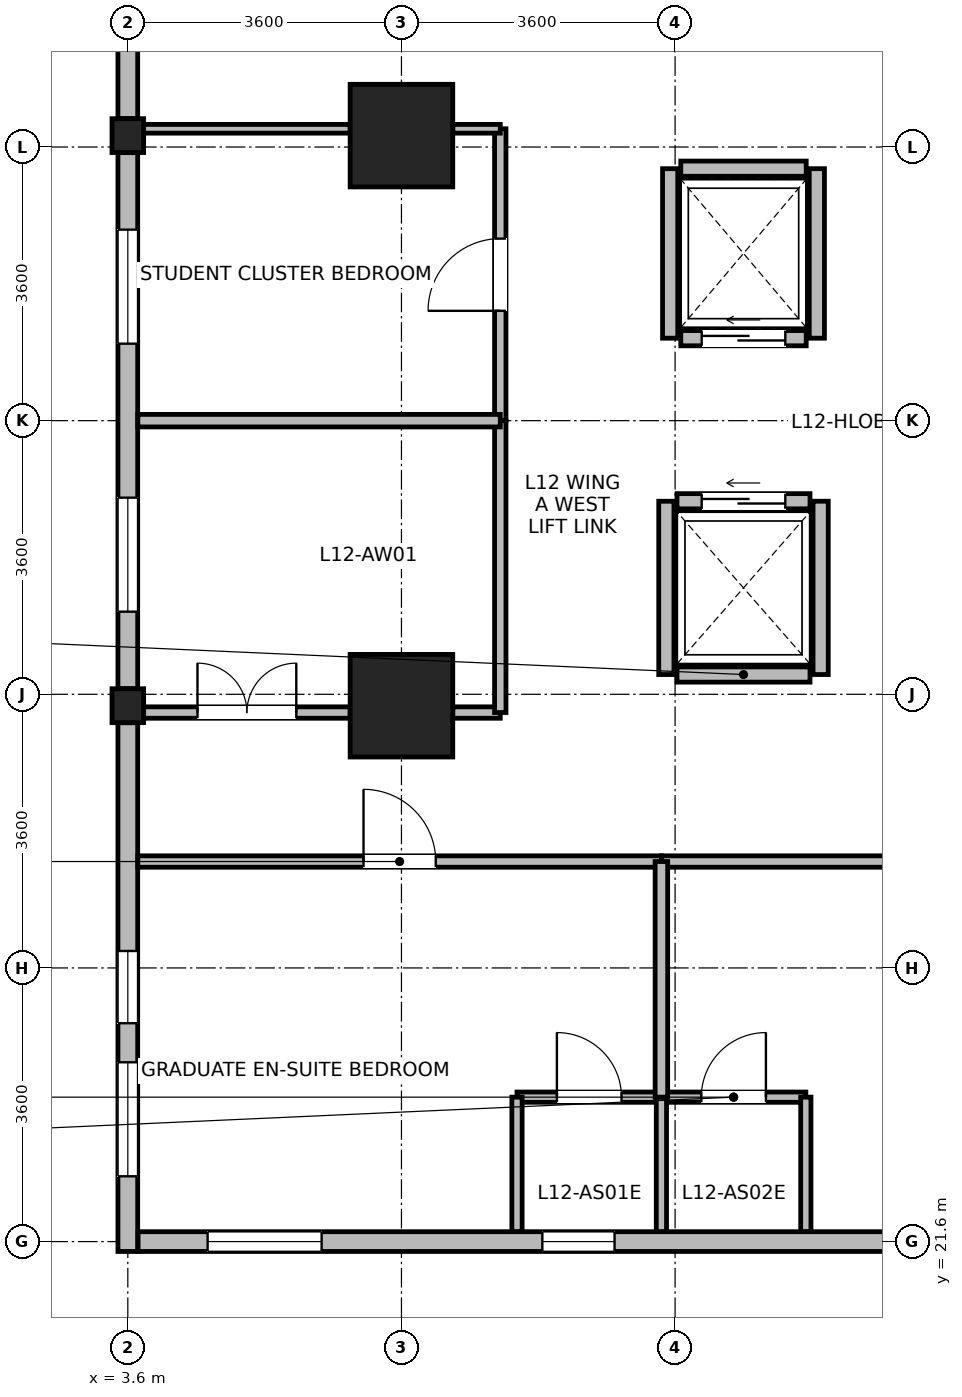
"""IFC4 building model, lengths in metres.
Left out: names, types, materials, properties, quantities, classifications, styles, units other than length and angle.
Written with IfcOpenShell. Run it as: python <this file> out.ifc"""

import sys

from ifc_helpers import new_model, si_unit, direction, frame, frame_2d, origin, origin_2d, place, context, subcontext, project, spatial, rectangle, i_section, extrude, source, transform, mapped, element, fill, save


model = new_model("IFC4")
c1 = context("Model", 3, precision=1e-05, world=origin(), true_north=direction((0.0, 1.0)))
c2 = subcontext(c1, "Body", "Model", "MODEL_VIEW")
j1 = project(units=[si_unit("LENGTHUNIT", "METRE"), si_unit("PLANEANGLEUNIT", "RADIAN")], contexts=[c1])
p1 = place(None, origin())
s1 = spatial("IfcSite", under=j1, at=p1, CompositionType="ELEMENT")
p2 = place(p1, origin())
s2 = spatial("IfcBuilding", under=s1, at=p2, CompositionType="ELEMENT")
p3 = place(p2, frame((0.0, 0.0, 51.2)))
s3 = spatial("IfcBuildingStorey", under=s2, at=p3, CompositionType="ELEMENT", Elevation=51.2)
m1 = source(origin(), c2, "Body", "SweptSolid", [
    extrude(rectangle(XDim=1.35, YDim=1.35, at=origin_2d()), origin(), (0.0, 0.0, 1.0), 3.7),
])
for number, where, z_axis, x_axis in (
    (1, (7.2, 28.65, 0.0), (0.0, 0.0, 1.0), (1.0, 0.0, 0.0)),
    (2, (7.2, 36.15, 0.0), (0.0, 0.0, 1.0), (1.0, 0.0, 0.0)),
):
    element("IfcColumn", number, at=place(p3, frame(where, z_axis=z_axis, x_axis=x_axis)), inside=s3, PredefinedType="COLUMN", context=c2, shape_type="MappedRepresentation", body=[
        mapped(m1, transform((0.0, 0.0, 0.0), x_axis=(1.0, 0.0, 0.0), y_axis=(0.0, 1.0, 0.0), z_axis=(0.0, 0.0, 1.0), scale=1.0)),
    ])
m2 = source(origin(), c2, "Body", "SweptSolid", [
    extrude(i_section(OverallWidth=0.416, OverallDepth=0.446, WebThickness=0.029, FlangeThickness=0.04, FilletRadius=0.015, at=origin_2d()), origin(), (0.0, 0.0, 1.0), 3.7),
])
for number, where, z_axis, x_axis in (
    (3, (3.6, 28.65, 0.0), (0.0, 0.0, 1.0), (1.0, 0.0, 0.0)),
    (4, (3.6, 36.15, 0.0), (0.0, 0.0, 1.0), (1.0, 0.0, 0.0)),
):
    element("IfcColumn", number, at=place(p3, frame(where, z_axis=z_axis, x_axis=x_axis)), inside=s3, PredefinedType="COLUMN", context=c2, shape_type="MappedRepresentation", body=[
        mapped(m2, transform((0.0, 0.0, 0.0), x_axis=(1.0, 0.0, 0.0), y_axis=(0.0, 1.0, 0.0), z_axis=(0.0, 0.0, 1.0), scale=1.0)),
    ])
p4 = place(p3, frame((3.6, 36.374, 0.0), z_axis=(0.0, 0.0, 1.0), x_axis=(0.0, 1.0, 0.0)))
e5 = element("IfcWall", 5, at=p4, inside=s3, PredefinedType="STANDARD", context=c2, shape_type="SweptSolid", body=[
    extrude(rectangle(XDim=3.356, YDim=0.26, at=frame_2d((1.678, 0.0))), origin(), (0.0, 0.0, 1.0), 3.43),
])
p5 = place(p4, frame((0.928, 0.0, 0.85)))
e6 = element("IfcOpeningElement", 6, at=p5, cuts=e5, PredefinedType="OPENING", context=c2, shape_type="SweptSolid", body=[
    extrude(rectangle(XDim=1.5, YDim=1.85, at=frame_2d((0.75, 0.925))), frame((0.0, 0.14, 0.0), z_axis=(0.0, -1.0, 0.0), x_axis=(1.0, 0.0, 0.0)), (0.0, 0.0, 1.0), 0.28),
])
p6 = place(p3, frame((3.6, 28.874, 0.0), z_axis=(0.0, 0.0, 1.0), x_axis=(0.0, 1.0, 0.0)))
e7 = element("IfcWall", 7, at=p6, inside=s3, PredefinedType="STANDARD", context=c2, shape_type="SweptSolid", body=[
    extrude(rectangle(XDim=7.052, YDim=0.26, at=frame_2d((3.526, 0.0))), origin(), (0.0, 0.0, 1.0), 2.93),
])
p7 = place(p6, frame((1.013, 0.0, 0.85)))
e8 = element("IfcOpeningElement", 8, at=p7, cuts=e7, PredefinedType="OPENING", context=c2, shape_type="SweptSolid", body=[
    extrude(rectangle(XDim=1.5, YDim=1.85, at=frame_2d((0.75, 0.925))), frame((0.0, 0.14, 0.0), z_axis=(0.0, -1.0, 0.0), x_axis=(1.0, 0.0, 0.0)), (0.0, 0.0, 1.0), 0.28),
])
p8 = place(p6, frame((4.539, 0.0, 0.85)))
e9 = element("IfcOpeningElement", 9, at=p8, cuts=e7, PredefinedType="OPENING", context=c2, shape_type="SweptSolid", body=[
    extrude(rectangle(XDim=1.5, YDim=1.85, at=frame_2d((0.75, 0.925))), frame((0.0, 0.14, 0.0), z_axis=(0.0, -1.0, 0.0), x_axis=(1.0, 0.0, 0.0)), (0.0, 0.0, 1.0), 0.28),
])
p9 = place(p3, frame((3.6, 21.47, 0.0), z_axis=(0.0, 0.0, 1.0), x_axis=(0.0, 1.0, 0.0)))
e10 = element("IfcWall", 10, at=p9, inside=s3, PredefinedType="STANDARD", context=c2, shape_type="SweptSolid", body=[
    extrude(rectangle(XDim=6.956, YDim=0.26, at=frame_2d((3.478, 0.0))), origin(), (0.0, 0.0, 1.0), 3.43),
])
p10 = place(p9, frame((0.989, 0.0, 0.85)))
e11 = element("IfcOpeningElement", 11, at=p10, cuts=e10, PredefinedType="OPENING", context=c2, shape_type="SweptSolid", body=[
    extrude(rectangle(XDim=1.5, YDim=1.85, at=frame_2d((0.75, 0.925))), frame((0.0, 0.14, 0.0), z_axis=(0.0, -1.0, 0.0), x_axis=(1.0, 0.0, 0.0)), (0.0, 0.0, 1.0), 0.28),
])
p11 = place(p9, frame((3.003, 0.0, 0.85)))
e12 = element("IfcOpeningElement", 12, at=p11, cuts=e10, PredefinedType="OPENING", context=c2, shape_type="SweptSolid", body=[
    extrude(rectangle(XDim=0.95, YDim=1.75, at=frame_2d((0.475, 0.875))), frame((0.0, 0.14, 0.0), z_axis=(0.0, -1.0, 0.0), x_axis=(1.0, 0.0, 0.0)), (0.0, 0.0, 1.0), 0.28),
])
p12 = place(p3, frame((13.724, 21.6, 0.0), z_axis=(0.0, 0.0, 1.0), x_axis=(-1.0, 0.0, 0.0)))
e13 = element("IfcWall", 13, at=p12, inside=s3, PredefinedType="STANDARD", context=c2, shape_type="SweptSolid", body=[
    extrude(rectangle(XDim=9.989, YDim=0.26, at=frame_2d((4.995, 0.0))), origin(), (0.0, 0.0, 1.0), 3.43),
])
p13 = place(p12, frame((7.574, 0.0, 0.85)))
e14 = element("IfcOpeningElement", 14, at=p13, cuts=e13, PredefinedType="OPENING", context=c2, shape_type="SweptSolid", body=[
    extrude(rectangle(XDim=1.5, YDim=1.85, at=frame_2d((0.75, 0.925))), frame((0.0, 0.14, 0.0), z_axis=(0.0, -1.0, 0.0), x_axis=(1.0, 0.0, 0.0)), (0.0, 0.0, 1.0), 0.28),
])
p14 = place(p12, frame((3.72, 0.0, 0.85)))
e15 = element("IfcOpeningElement", 15, at=p14, cuts=e13, PredefinedType="OPENING", context=c2, shape_type="SweptSolid", body=[
    extrude(rectangle(XDim=0.95, YDim=1.75, at=frame_2d((0.475, 0.875))), frame((0.0, 0.14, 0.0), z_axis=(0.0, -1.0, 0.0), x_axis=(1.0, 0.0, 0.0)), (0.0, 0.0, 1.0), 0.28),
])
p15 = place(p3, frame((10.825, 29.06, 0.0), z_axis=(0.0, 0.0, 1.0), x_axis=(1.0, 0.0, 0.0)))
e16 = element("IfcWall", 16, at=p15, inside=s3, PredefinedType="PARTITIONING", context=c2, shape_type="SweptSolid", body=[
    extrude(rectangle(XDim=1.75, YDim=0.2, at=frame_2d((0.875, 0.0))), origin(), (0.0, 0.0, 1.0), 3.43),
])
p16 = place(p3, frame((10.825, 31.34, 0.0), z_axis=(0.0, 0.0, 1.0), x_axis=(1.0, 0.0, 0.0)))
e17 = element("IfcWall", 17, at=p16, inside=s3, PredefinedType="PARTITIONING", context=c2, shape_type="SweptSolid", body=[
    extrude(rectangle(XDim=1.75, YDim=0.2, at=frame_2d((0.875, 0.0))), origin(), (0.0, 0.0, 1.0), 3.43),
])
p17 = place(p16, frame((0.325, 0.0, 0.0)))
e18 = element("IfcOpeningElement", 18, at=p17, cuts=e17, PredefinedType="OPENING", context=c2, shape_type="SweptSolid", body=[
    extrude(rectangle(XDim=1.1, YDim=2.12, at=frame_2d((0.55, 1.06))), frame((0.0, 0.11, 0.0), z_axis=(0.0, -1.0, 0.0), x_axis=(1.0, 0.0, 0.0)), (0.0, 0.0, 1.0), 0.22),
])
for number, where, z_axis, x_axis in (
    (19, (10.685, 29.06, 0.0), (0.0, 0.0, 1.0), (0.0, 1.0, 0.0)),
    (20, (12.715, 29.06, 0.0), (0.0, 0.0, 1.0), (0.0, 1.0, 0.0)),
):
    element("IfcWall", number, at=place(p3, frame(where, z_axis=z_axis, x_axis=x_axis)), inside=s3, PredefinedType="PARTITIONING", context=c2, shape_type="SweptSolid", body=[
        extrude(rectangle(XDim=2.28, YDim=0.2, at=frame_2d((1.14, 0.0))), origin(), (0.0, 0.0, 1.0), 3.43),
    ])
p18 = place(p3, frame((10.875, 33.485, 0.0), z_axis=(0.0, 0.0, 1.0), x_axis=(1.0, 0.0, 0.0)))
e21 = element("IfcWall", 21, at=p18, inside=s3, PredefinedType="PARTITIONING", context=c2, shape_type="SweptSolid", body=[
    extrude(rectangle(XDim=1.65, YDim=0.2, at=frame_2d((0.825, 0.0))), origin(), (0.0, 0.0, 1.0), 3.43),
])
p19 = place(p18, frame((0.275, 0.0, 0.0)))
e22 = element("IfcOpeningElement", 22, at=p19, cuts=e21, PredefinedType="OPENING", context=c2, shape_type="SweptSolid", body=[
    extrude(rectangle(XDim=1.1, YDim=2.12, at=frame_2d((0.55, 1.06))), frame((0.0, 0.11, 0.0), z_axis=(0.0, -1.0, 0.0), x_axis=(1.0, 0.0, 0.0)), (0.0, 0.0, 1.0), 0.22),
])
p20 = place(p3, frame((10.875, 35.715, 0.0), z_axis=(0.0, 0.0, 1.0), x_axis=(1.0, 0.0, 0.0)))
e23 = element("IfcWall", 23, at=p20, inside=s3, PredefinedType="PARTITIONING", context=c2, shape_type="SweptSolid", body=[
    extrude(rectangle(XDim=1.65, YDim=0.2, at=frame_2d((0.825, 0.0))), origin(), (0.0, 0.0, 1.0), 3.43),
])
for number, where, z_axis, x_axis in (
    (24, (10.735, 33.485, 0.0), (0.0, 0.0, 1.0), (0.0, 1.0, 0.0)),
    (25, (12.665, 33.485, 0.0), (0.0, 0.0, 1.0), (0.0, 1.0, 0.0)),
):
    element("IfcWall", number, at=place(p3, frame(where, z_axis=z_axis, x_axis=x_axis)), inside=s3, PredefinedType="PARTITIONING", context=c2, shape_type="SweptSolid", body=[
        extrude(rectangle(XDim=2.23, YDim=0.2, at=frame_2d((1.115, 0.0))), origin(), (0.0, 0.0, 1.0), 3.43),
    ])
p21 = place(p3, frame((10.62, 23.5, 0.0), z_axis=(0.0, 0.0, 1.0), x_axis=(1.0, 0.0, 0.0)))
e26 = element("IfcWall", 26, at=p21, inside=s3, PredefinedType="PARTITIONING", context=c2, shape_type="SweptSolid", body=[
    extrude(rectangle(XDim=1.9, YDim=0.135, at=frame_2d((0.95, 0.0))), origin(), (0.0, 0.0, 1.0), 3.43),
])
p22 = place(p21, frame((0.525, 0.0, 0.0)))
e27 = element("IfcOpeningElement", 27, at=p22, cuts=e26, PredefinedType="OPENING", context=c2, shape_type="SweptSolid", body=[
    extrude(rectangle(XDim=0.85, YDim=2.04, at=frame_2d((0.425, 1.02))), frame((0.0, 0.078, 0.0), z_axis=(0.0, -1.0, 0.0), x_axis=(1.0, 0.0, 0.0)), (0.0, 0.0, 1.0), 0.155),
])
p23 = place(p3, frame((8.72, 23.5, 0.0), z_axis=(0.0, 0.0, 1.0), x_axis=(1.0, 0.0, 0.0)))
e28 = element("IfcWall", 28, at=p23, inside=s3, PredefinedType="PARTITIONING", context=c2, shape_type="SweptSolid", body=[
    extrude(rectangle(XDim=1.9, YDim=0.135, at=frame_2d((0.95, 0.0))), origin(), (0.0, 0.0, 1.0), 3.43),
])
p24 = place(p23, frame((0.525, 0.0, 0.0)))
e29 = element("IfcOpeningElement", 29, at=p24, cuts=e28, PredefinedType="OPENING", context=c2, shape_type="SweptSolid", body=[
    extrude(rectangle(XDim=0.85, YDim=2.04, at=frame_2d((0.425, 1.02))), frame((0.0, 0.078, 0.0), z_axis=(0.0, -1.0, 0.0), x_axis=(1.0, 0.0, 0.0)), (0.0, 0.0, 1.0), 0.155),
])
for number, where, z_axis, x_axis in (
    (30, (8.72, 21.732, 0.0), (0.0, 0.0, 1.0), (0.0, 1.0, 0.0)),
    (31, (10.62, 21.732, 0.0), (0.0, 0.0, 1.0), (0.0, 1.0, 0.0)),
    (32, (12.52, 21.732, 0.0), (0.0, 0.0, 1.0), (0.0, 1.0, 0.0)),
):
    element("IfcWall", number, at=place(p3, frame(where, z_axis=z_axis, x_axis=x_axis)), inside=s3, PredefinedType="PARTITIONING", context=c2, shape_type="SweptSolid", body=[
        extrude(rectangle(XDim=1.768, YDim=0.135, at=frame_2d((0.884, 0.0))), origin(), (0.0, 0.0, 1.0), 3.43),
    ])
p25 = place(p3, frame((10.62, 26.6, 0.0), z_axis=(0.0, 0.0, 1.0), x_axis=(1.0, 0.0, 0.0)))
e33 = element("IfcWall", 33, at=p25, inside=s3, PredefinedType="PARTITIONING", context=c2, shape_type="SweptSolid", body=[
    extrude(rectangle(XDim=7.42, YDim=0.15, at=frame_2d((3.71, 0.0))), origin(), (0.0, 0.0, 1.0), 3.43),
])
p26 = place(p25, frame((3.235, 0.0, 0.0)))
e34 = element("IfcOpeningElement", 34, at=p26, cuts=e33, PredefinedType="OPENING", context=c2, shape_type="SweptSolid", body=[
    extrude(rectangle(XDim=0.95, YDim=2.1, at=frame_2d((0.475, 1.05))), frame((0.0, 0.085, 0.0), z_axis=(0.0, -1.0, 0.0), x_axis=(1.0, 0.0, 0.0)), (0.0, 0.0, 1.0), 0.17),
])
p27 = place(p3, frame((3.732, 26.6, 0.0), z_axis=(0.0, 0.0, 1.0), x_axis=(1.0, 0.0, 0.0)))
e35 = element("IfcWall", 35, at=p27, inside=s3, PredefinedType="PARTITIONING", context=c2, shape_type="SweptSolid", body=[
    extrude(rectangle(XDim=6.888, YDim=0.15, at=frame_2d((3.444, 0.0))), origin(), (0.0, 0.0, 1.0), 3.43),
])
p28 = place(p27, frame((2.969, 0.0, 0.0)))
e36 = element("IfcOpeningElement", 36, at=p28, cuts=e35, PredefinedType="OPENING", context=c2, shape_type="SweptSolid", body=[
    extrude(rectangle(XDim=0.95, YDim=2.1, at=frame_2d((0.475, 1.05))), frame((0.0, 0.085, 0.0), z_axis=(0.0, -1.0, 0.0), x_axis=(1.0, 0.0, 0.0)), (0.0, 0.0, 1.0), 0.17),
])
p29 = place(p3, frame((3.808, 28.56, 0.0), z_axis=(0.0, 0.0, 1.0), x_axis=(1.0, 0.0, 0.0)))
e37 = element("IfcWall", 37, at=p29, inside=s3, PredefinedType="PARTITIONING", context=c2, shape_type="SweptSolid", body=[
    extrude(rectangle(XDim=2.717, YDim=0.15, at=frame_2d((1.358, 0.0))), origin(), (0.0, 0.0, 1.0), 2.78),
])
p30 = place(p29, frame((0.708, 0.0, 0.0)))
e38 = element("IfcOpeningElement", 38, at=p30, cuts=e37, PredefinedType="OPENING", context=c2, shape_type="SweptSolid", body=[
    extrude(rectangle(XDim=1.3, YDim=2.12, at=frame_2d((0.65, 1.06))), frame((0.0, 0.085, 0.0), z_axis=(0.0, -1.0, 0.0), x_axis=(1.0, 0.0, 0.0)), (0.0, 0.0, 1.0), 0.17),
])
p31 = place(p3, frame((7.875, 28.56, 0.0), z_axis=(0.0, 0.0, 1.0), x_axis=(1.0, 0.0, 0.0)))
e39 = element("IfcWall", 39, at=p31, inside=s3, PredefinedType="PARTITIONING", context=c2, shape_type="SweptSolid", body=[
    extrude(rectangle(XDim=0.625, YDim=0.15, at=frame_2d((0.312, 0.0))), origin(), (0.0, 0.0, 1.0), 2.78),
])
p32 = place(p3, frame((8.5, 32.4, 0.0), z_axis=(0.0, 0.0, 1.0), x_axis=(0.0, 1.0, 0.0)))
e40 = element("IfcWall", 40, at=p32, inside=s3, PredefinedType="PARTITIONING", context=c2, shape_type="SweptSolid", body=[
    extrude(rectangle(XDim=3.84, YDim=0.15, at=frame_2d((1.92, 0.0))), origin(), (0.0, 0.0, 1.0), 3.43),
])
p33 = place(p32, frame((1.445, 0.0, 0.0)))
e41 = element("IfcOpeningElement", 41, at=p33, cuts=e40, PredefinedType="OPENING", context=c2, shape_type="SweptSolid", body=[
    extrude(rectangle(XDim=0.95, YDim=2.1, at=frame_2d((0.475, 1.05))), frame((0.0, 0.085, 0.0), z_axis=(0.0, -1.0, 0.0), x_axis=(1.0, 0.0, 0.0)), (0.0, 0.0, 1.0), 0.17),
])
p34 = place(p3, frame((8.5, 28.56, 0.0), z_axis=(0.0, 0.0, 1.0), x_axis=(0.0, 1.0, 0.0)))
e42 = element("IfcWall", 42, at=p34, inside=s3, PredefinedType="PARTITIONING", context=c2, shape_type="SweptSolid", body=[
    extrude(rectangle(XDim=3.84, YDim=0.15, at=frame_2d((1.92, 0.0))), origin(), (0.0, 0.0, 1.0), 3.43),
])
p35 = place(p3, frame((3.732, 32.4, 0.0), z_axis=(0.0, 0.0, 1.0), x_axis=(1.0, 0.0, 0.0)))
e43 = element("IfcWall", 43, at=p35, inside=s3, PredefinedType="PARTITIONING", context=c2, shape_type="SweptSolid", body=[
    extrude(rectangle(XDim=4.768, YDim=0.165, at=frame_2d((2.384, 0.0))), origin(), (0.0, 0.0, 1.0), 3.43),
])
p36 = place(p3, frame((3.808, 36.24, 0.0), z_axis=(0.0, 0.0, 1.0), x_axis=(1.0, 0.0, 0.0)))
e44 = element("IfcWall", 44, at=p36, inside=s3, PredefinedType="PARTITIONING", context=c2, shape_type="SweptSolid", body=[
    extrude(rectangle(XDim=2.717, YDim=0.115, at=frame_2d((1.358, 0.0))), origin(), (0.0, 0.0, 1.0), 2.78),
])
p37 = place(p3, frame((7.875, 36.24, 0.0), z_axis=(0.0, 0.0, 1.0), x_axis=(1.0, 0.0, 0.0)))
e45 = element("IfcWall", 45, at=p37, inside=s3, PredefinedType="PARTITIONING", context=c2, shape_type="SweptSolid", body=[
    extrude(rectangle(XDim=0.625, YDim=0.115, at=frame_2d((0.312, 0.0))), origin(), (0.0, 0.0, 1.0), 2.78),
])
p38 = place(p3, frame((10.62, 23.5, 0.0), z_axis=(0.0, 0.0, 1.0), x_axis=(0.0, 1.0, 0.0)))
e46 = element("IfcWall", 46, at=p38, inside=s3, PredefinedType="PARTITIONING", context=c2, shape_type="SweptSolid", body=[
    extrude(rectangle(XDim=3.1, YDim=0.165, at=frame_2d((1.55, 0.0))), origin(), (0.0, 0.0, 1.0), 3.43),
])
p39 = place(p7, origin())
e47 = element("IfcWindow", 47, at=p39, inside=s3, PartitioningType="SINGLE_PANEL", PredefinedType="WINDOW", context=c2, shape_type="SweptSolid", body=[
    extrude(rectangle(XDim=1.5, YDim=1.85, at=frame_2d((0.75, 0.925))), frame((0.0, 0.03, 0.0), z_axis=(0.0, -1.0, 0.0), x_axis=(1.0, 0.0, 0.0)), (0.0, 0.0, 1.0), 0.06),
])
fill(e8, e47)
p40 = place(p8, origin())
e48 = element("IfcWindow", 48, at=p40, inside=s3, PartitioningType="SINGLE_PANEL", PredefinedType="WINDOW", context=c2, shape_type="SweptSolid", body=[
    extrude(rectangle(XDim=1.5, YDim=1.85, at=frame_2d((0.75, 0.925))), frame((0.0, 0.03, 0.0), z_axis=(0.0, -1.0, 0.0), x_axis=(1.0, 0.0, 0.0)), (0.0, 0.0, 1.0), 0.06),
])
fill(e9, e48)
p41 = place(p10, origin())
e49 = element("IfcWindow", 49, at=p41, inside=s3, PartitioningType="SINGLE_PANEL", PredefinedType="WINDOW", context=c2, shape_type="SweptSolid", body=[
    extrude(rectangle(XDim=1.5, YDim=1.85, at=frame_2d((0.75, 0.925))), frame((0.0, 0.03, 0.0), z_axis=(0.0, -1.0, 0.0), x_axis=(1.0, 0.0, 0.0)), (0.0, 0.0, 1.0), 0.06),
])
fill(e11, e49)
p42 = place(p11, origin())
e50 = element("IfcWindow", 50, at=p42, inside=s3, PartitioningType="SINGLE_PANEL", PredefinedType="WINDOW", context=c2, shape_type="SweptSolid", body=[
    extrude(rectangle(XDim=0.95, YDim=1.75, at=frame_2d((0.475, 0.875))), frame((0.0, 0.03, 0.0), z_axis=(0.0, -1.0, 0.0), x_axis=(1.0, 0.0, 0.0)), (0.0, 0.0, 1.0), 0.06),
])
fill(e12, e50)
p43 = place(p13, origin())
e51 = element("IfcWindow", 51, at=p43, inside=s3, PartitioningType="SINGLE_PANEL", PredefinedType="WINDOW", context=c2, shape_type="SweptSolid", body=[
    extrude(rectangle(XDim=1.5, YDim=1.85, at=frame_2d((0.75, 0.925))), frame((0.0, 0.03, 0.0), z_axis=(0.0, -1.0, 0.0), x_axis=(1.0, 0.0, 0.0)), (0.0, 0.0, 1.0), 0.06),
])
fill(e14, e51)
p44 = place(p14, origin())
e52 = element("IfcWindow", 52, at=p44, inside=s3, PartitioningType="SINGLE_PANEL", PredefinedType="WINDOW", context=c2, shape_type="SweptSolid", body=[
    extrude(rectangle(XDim=0.95, YDim=1.75, at=frame_2d((0.475, 0.875))), frame((0.0, 0.03, 0.0), z_axis=(0.0, -1.0, 0.0), x_axis=(1.0, 0.0, 0.0)), (0.0, 0.0, 1.0), 0.06),
])
fill(e15, e52)
p45 = place(p17, origin())
e53 = element("IfcDoor", 53, at=p45, inside=s3, OperationType="SLIDING_TO_LEFT", PredefinedType="DOOR", context=c2, shape_type="SweptSolid", body=[
    extrude(rectangle(XDim=1.1, YDim=2.12, at=frame_2d((0.55, 1.06))), frame((0.0, 0.025, 0.0), z_axis=(0.0, -1.0, 0.0), x_axis=(1.0, 0.0, 0.0)), (0.0, 0.0, 1.0), 0.05),
])
fill(e18, e53)
p46 = place(p19, origin())
e54 = element("IfcDoor", 54, at=p46, inside=s3, OperationType="SLIDING_TO_LEFT", PredefinedType="DOOR", context=c2, shape_type="SweptSolid", body=[
    extrude(rectangle(XDim=1.1, YDim=2.12, at=frame_2d((0.55, 1.06))), frame((0.0, 0.025, 0.0), z_axis=(0.0, -1.0, 0.0), x_axis=(1.0, 0.0, 0.0)), (0.0, 0.0, 1.0), 0.05),
])
fill(e22, e54)
p47 = place(p22, origin())
e55 = element("IfcDoor", 55, at=p47, inside=s3, OperationType="SINGLE_SWING_RIGHT", PredefinedType="DOOR", context=c2, shape_type="SweptSolid", body=[
    extrude(rectangle(XDim=0.85, YDim=2.04, at=frame_2d((0.425, 1.02))), frame((0.0, 0.025, 0.0), z_axis=(0.0, -1.0, 0.0), x_axis=(1.0, 0.0, 0.0)), (0.0, 0.0, 1.0), 0.05),
])
fill(e27, e55)
p48 = place(p24, origin())
e56 = element("IfcDoor", 56, at=p48, inside=s3, OperationType="SINGLE_SWING_LEFT", PredefinedType="DOOR", context=c2, shape_type="SweptSolid", body=[
    extrude(rectangle(XDim=0.85, YDim=2.04, at=frame_2d((0.425, 1.02))), frame((0.0, 0.025, 0.0), z_axis=(0.0, -1.0, 0.0), x_axis=(1.0, 0.0, 0.0)), (0.0, 0.0, 1.0), 0.05),
])
fill(e29, e56)
p49 = place(p28, origin())
e57 = element("IfcDoor", 57, at=p49, inside=s3, OperationType="SINGLE_SWING_LEFT", PredefinedType="DOOR", context=c2, shape_type="SweptSolid", body=[
    extrude(rectangle(XDim=0.95, YDim=2.1, at=frame_2d((0.475, 1.05))), frame((0.0, 0.025, 0.0), z_axis=(0.0, -1.0, 0.0), x_axis=(1.0, 0.0, 0.0)), (0.0, 0.0, 1.0), 0.05),
])
fill(e36, e57)
p50 = place(p30, origin())
e58 = element("IfcDoor", 58, at=p50, inside=s3, OperationType="DOUBLE_DOOR_SINGLE_SWING", PredefinedType="DOOR", context=c2, shape_type="SweptSolid", body=[
    extrude(rectangle(XDim=1.3, YDim=2.12, at=frame_2d((0.65, 1.06))), frame((0.0, 0.025, 0.0), z_axis=(0.0, -1.0, 0.0), x_axis=(1.0, 0.0, 0.0)), (0.0, 0.0, 1.0), 0.05),
])
fill(e38, e58)
p51 = place(p33, origin())
e59 = element("IfcDoor", 59, at=p51, inside=s3, OperationType="SINGLE_SWING_LEFT", PredefinedType="DOOR", context=c2, shape_type="SweptSolid", body=[
    extrude(rectangle(XDim=0.95, YDim=2.1, at=frame_2d((0.475, 1.05))), frame((0.0, 0.025, 0.0), z_axis=(0.0, -1.0, 0.0), x_axis=(1.0, 0.0, 0.0)), (0.0, 0.0, 1.0), 0.05),
])
fill(e41, e59)
save(model, sys.argv[1])
